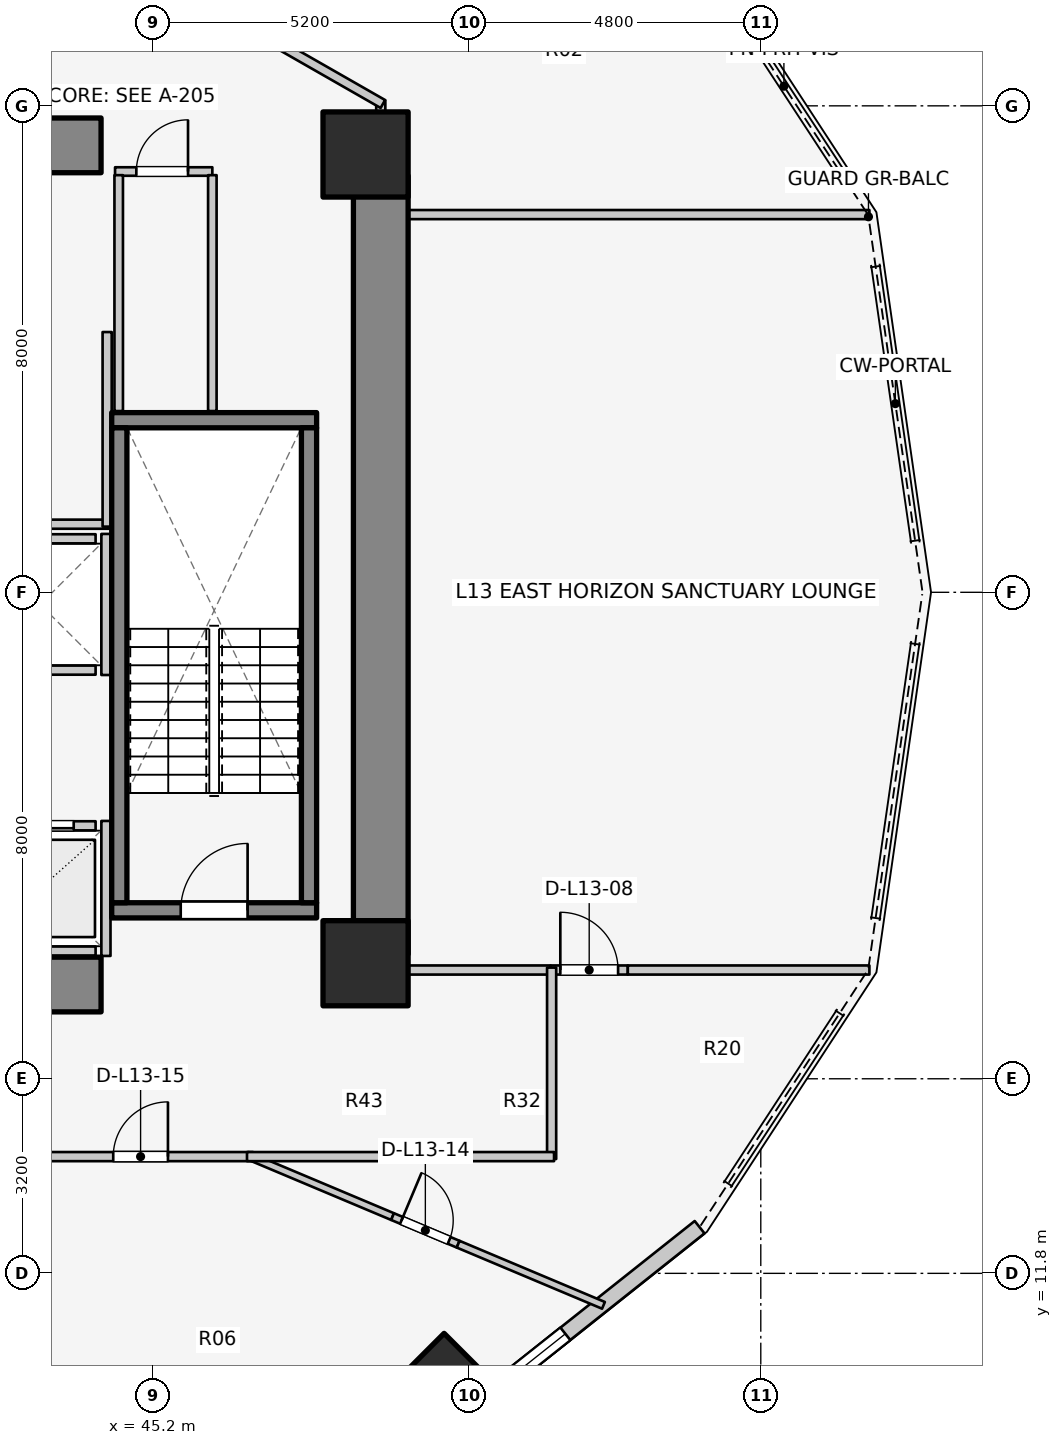
"""IFC4 building model, lengths in metres.
Left out: names, types, materials, properties, quantities, classifications, styles, units other than length and angle.
Written with IfcOpenShell. Run it as: python <this file> out.ifc"""

import sys

from ifc_helpers import new_model, si_unit, direction, frame, frame_2d, origin, origin_2d, place, context, subcontext, project, spatial, rectangle, extrude, element, fill, save


model = new_model("IFC4")
c1 = context("Model", 3, precision=1e-05, world=origin(), true_north=direction((0.0, 1.0)))
c2 = subcontext(c1, "Body", "Model", "MODEL_VIEW")
j1 = project(units=[si_unit("LENGTHUNIT", "METRE"), si_unit("PLANEANGLEUNIT", "RADIAN")], contexts=[c1])
p1 = place(None, origin())
s1 = spatial("IfcSite", under=j1, at=p1, CompositionType="ELEMENT")
p2 = place(p1, origin())
s2 = spatial("IfcBuilding", under=s1, at=p2, CompositionType="ELEMENT")
p3 = place(p2, frame((0.0, 0.0, 46.2)))
s3 = spatial("IfcBuildingStorey", under=s2, at=p3, CompositionType="ELEMENT", Elevation=46.2)
p4 = place(p3, frame((48.95, 17.05, 0.0), z_axis=(0.0, 0.0, 1.0), x_axis=(0.0, 1.0, 0.0)))
e1 = element("IfcWall", 1, at=p4, inside=s3, PredefinedType="SHEAR", context=c2, shape_type="SweptSolid", body=[
    extrude(rectangle(XDim=12.8, YDim=0.9, at=frame_2d((6.4, 0.0))), origin(), (0.0, 0.0, 1.0), 3.1),
])
for number, where, z_axis, x_axis in (
    (2, (39.85, 16.55, 0.0), (0.0, 0.0, 1.0), (1.0, 0.0, 0.0)),
    (3, (39.85, 30.35, 0.0), (0.0, 0.0, 1.0), (1.0, 0.0, 0.0)),
):
    element("IfcWall", number, at=place(p3, frame(where, z_axis=z_axis, x_axis=x_axis)), inside=s3, PredefinedType="SHEAR", context=c2, shape_type="SweptSolid", body=[
        extrude(rectangle(XDim=4.5, YDim=0.9, at=frame_2d((2.25, 0.0))), origin(), (0.0, 0.0, 1.0), 3.1),
    ])
p5 = place(p3, frame((44.525, 17.77, 0.0), z_axis=(0.0, 0.0, 1.0), x_axis=(1.0, 0.0, 0.0)))
e4 = element("IfcWall", 4, at=p5, inside=s3, PredefinedType="SOLIDWALL", context=c2, shape_type="SweptSolid", body=[
    extrude(rectangle(XDim=3.37, YDim=0.25, at=frame_2d((1.685, 0.0))), origin(), (0.0, 0.0, 1.0), 3.1),
])
p6 = place(p5, frame((1.135, 0.0, 0.0)))
e5 = element("IfcOpeningElement", 5, at=p6, cuts=e4, PredefinedType="OPENING", context=c2, shape_type="SweptSolid", body=[
    extrude(rectangle(XDim=1.1, YDim=2.1, at=frame_2d((0.55, 1.05))), frame((0.0, 0.135, 0.0), z_axis=(0.0, -1.0, 0.0), x_axis=(1.0, 0.0, 0.0)), (0.0, 0.0, 1.0), 0.27),
])
p7 = place(p3, frame((44.525, 25.83, 0.0), z_axis=(0.0, 0.0, 1.0), x_axis=(1.0, 0.0, 0.0)))
e6 = element("IfcWall", 6, at=p7, inside=s3, PredefinedType="SOLIDWALL", context=c2, shape_type="SweptSolid", body=[
    extrude(rectangle(XDim=3.37, YDim=0.25, at=frame_2d((1.685, 0.0))), origin(), (0.0, 0.0, 1.0), 3.1),
])
for number, where, z_axis, x_axis in (
    (7, (44.65, 17.895, 0.0), (0.0, 0.0, 1.0), (0.0, 1.0, 0.0)),
    (8, (47.77, 17.895, 0.0), (0.0, 0.0, 1.0), (0.0, 1.0, 0.0)),
):
    element("IfcWall", number, at=place(p3, frame(where, z_axis=z_axis, x_axis=x_axis)), inside=s3, PredefinedType="SOLIDWALL", context=c2, shape_type="SweptSolid", body=[
        extrude(rectangle(XDim=7.81, YDim=0.25, at=frame_2d((3.905, 0.0))), origin(), (0.0, 0.0, 1.0), 3.1),
    ])
for number, where, z_axis, x_axis in (
    (9, (48.7, 16.9, 0.0), (0.0, 0.0, 1.0), (1.0, 0.0, 0.0)),
    (10, (48.7, 30.2, 0.0), (0.0, 0.0, 1.0), (1.0, 0.0, 0.0)),
):
    element("IfcColumn", number, at=place(p3, frame(where, z_axis=z_axis, x_axis=x_axis)), inside=s3, PredefinedType="COLUMN", context=c2, shape_type="SweptSolid", body=[
        extrude(rectangle(XDim=1.4, YDim=1.4, at=origin_2d()), origin(), (0.0, 0.0, 1.0), 3.1),
    ])
p8 = place(p3, frame((49.992, 9.965, 0.0), z_axis=(0.0, 0.0, 1.0), x_axis=(0.707106781187, -0.707106781187, 0.0)))
e11 = element("IfcColumn", 11, at=p8, inside=s3, PredefinedType="COLUMN", context=c2, shape_type="SweptSolid", body=[
    extrude(rectangle(XDim=1.2, YDim=1.2, at=origin_2d()), origin(), (0.0, 0.0, 1.0), 3.1),
])
p9 = place(p3, frame((50.405, 9.55, 0.0), z_axis=(0.0, 0.0, 1.0), x_axis=(0.783123133379, 0.621866672179, 0.0)))
e12 = element("IfcWall", 12, at=p9, inside=s3, PredefinedType="STANDARD", context=c2, shape_type="SweptSolid", body=[
    extrude(rectangle(XDim=4.839, YDim=0.26, at=frame_2d((2.419, 0.0))), origin(), (0.0, 0.0, 1.0), 2.85),
])
p10 = place(p9, frame((0.819, 0.0, 0.75)))
e13 = element("IfcOpeningElement", 13, at=p10, cuts=e12, PredefinedType="OPENING", context=c2, shape_type="SweptSolid", body=[
    extrude(rectangle(XDim=1.2, YDim=1.5, at=frame_2d((0.6, 0.75))), frame((0.0, 0.14, 0.0), z_axis=(0.0, -1.0, 0.0), x_axis=(1.0, 0.0, 0.0)), (0.0, 0.0, 1.0), 0.28),
])
p11 = place(p3, frame((42.44, 19.16, 0.0), z_axis=(0.0, 0.0, 1.0), x_axis=(1.0, 0.0, 0.0)))
e14 = element("IfcWall", 14, at=p11, inside=s3, PredefinedType="SOLIDWALL", context=c2, shape_type="SweptSolid", body=[
    extrude(rectangle(XDim=1.82, YDim=0.15, at=frame_2d((0.91, 0.0))), origin(), (0.0, 0.0, 1.0), 2.855),
])
p12 = place(p11, frame((0.36, 0.0, 0.0)))
e15 = element("IfcOpeningElement", 15, at=p12, cuts=e14, PredefinedType="OPENING", context=c2, shape_type="SweptSolid", body=[
    extrude(rectangle(XDim=1.1, YDim=2.1, at=frame_2d((0.55, 1.05))), frame((0.0, 0.085, 0.0), z_axis=(0.0, -1.0, 0.0), x_axis=(1.0, 0.0, 0.0)), (0.0, 0.0, 1.0), 0.17),
])
p13 = place(p3, frame((42.44, 17.1, 0.0), z_axis=(0.0, 0.0, 1.0), x_axis=(1.0, 0.0, 0.0)))
e16 = element("IfcWall", 16, at=p13, inside=s3, PredefinedType="SOLIDWALL", context=c2, shape_type="SweptSolid", body=[
    extrude(rectangle(XDim=1.82, YDim=0.15, at=frame_2d((0.91, 0.0))), origin(), (0.0, 0.0, 1.0), 2.855),
])
p14 = place(p3, frame((44.43, 17.02, 0.0), z_axis=(0.0, 0.0, 1.0), x_axis=(0.0, 1.0, 0.0)))
e17 = element("IfcWall", 17, at=p14, inside=s3, PredefinedType="SOLIDWALL", context=c2, shape_type="SweptSolid", body=[
    extrude(rectangle(XDim=2.22, YDim=0.15, at=frame_2d((1.11, 0.0))), origin(), (0.0, 0.0, 1.0), 2.12),
])
for number, where, z_axis, x_axis in (
    (18, (42.44, 21.72, 0.0), (0.0, 0.0, 1.0), (1.0, 0.0, 0.0)),
    (19, (42.44, 23.88, 0.0), (0.0, 0.0, 1.0), (1.0, 0.0, 0.0)),
):
    element("IfcWall", number, at=place(p3, frame(where, z_axis=z_axis, x_axis=x_axis)), inside=s3, PredefinedType="SOLIDWALL", context=c2, shape_type="SweptSolid", body=[
        extrude(rectangle(XDim=1.82, YDim=0.15, at=frame_2d((0.91, 0.0))), origin(), (0.0, 0.0, 1.0), 2.855),
    ])
p15 = place(p3, frame((44.43, 21.64, 0.0), z_axis=(0.0, 0.0, 1.0), x_axis=(0.0, 1.0, 0.0)))
e20 = element("IfcWall", 20, at=p15, inside=s3, PredefinedType="SOLIDWALL", context=c2, shape_type="SweptSolid", body=[
    extrude(rectangle(XDim=2.32, YDim=0.15, at=frame_2d((1.16, 0.0))), origin(), (0.0, 0.0, 1.0), 2.855),
])
p16 = place(p3, frame((39.4, 24.12, 0.0), z_axis=(0.0, 0.0, 1.0), x_axis=(1.0, 0.0, 0.0)))
e21 = element("IfcWall", 21, at=p16, inside=s3, PredefinedType="PARTITIONING", context=c2, shape_type="SweptSolid", body=[
    extrude(rectangle(XDim=5.08, YDim=0.15, at=frame_2d((2.54, 0.0))), origin(), (0.0, 0.0, 1.0), 2.12),
])
p17 = place(p3, frame((44.45, 24.08, 0.0), z_axis=(0.0, 0.0, 1.0), x_axis=(0.0, 1.0, 0.0)))
e22 = element("IfcWall", 22, at=p17, inside=s3, PredefinedType="PARTITIONING", context=c2, shape_type="SweptSolid", body=[
    extrude(rectangle(XDim=3.2, YDim=0.15, at=frame_2d((1.6, 0.0))), origin(), (0.0, 0.0, 1.0), 2.855),
])
p18 = place(p3, frame((44.58, 29.92, 0.0), z_axis=(0.0, 0.0, 1.0), x_axis=(1.0, 0.0, 0.0)))
e23 = element("IfcWall", 23, at=p18, inside=s3, PredefinedType="PLUMBINGWALL", context=c2, shape_type="SweptSolid", body=[
    extrude(rectangle(XDim=1.6, YDim=0.14, at=frame_2d((0.8, 0.0))), origin(), (0.0, 0.0, 1.0), 2.855),
])
p19 = place(p18, frame((0.35, 0.0, 0.0)))
e24 = element("IfcOpeningElement", 24, at=p19, cuts=e23, PredefinedType="OPENING", context=c2, shape_type="SweptSolid", body=[
    extrude(rectangle(XDim=0.85, YDim=2.05, at=frame_2d((0.425, 1.025))), frame((0.0, 0.08, 0.0), z_axis=(0.0, -1.0, 0.0), x_axis=(1.0, 0.0, 0.0)), (0.0, 0.0, 1.0), 0.16),
])
for number, where, z_axis, x_axis in (
    (25, (44.64, 25.98, 0.0), (0.0, 0.0, 1.0), (0.0, 1.0, 0.0)),
    (26, (46.18, 25.98, 0.0), (0.0, 0.0, 1.0), (0.0, 1.0, 0.0)),
):
    element("IfcWall", number, at=place(p3, frame(where, z_axis=z_axis, x_axis=x_axis)), inside=s3, PredefinedType="PLUMBINGWALL", context=c2, shape_type="SweptSolid", body=[
        extrude(rectangle(XDim=3.88, YDim=0.14, at=frame_2d((1.94, 0.0))), origin(), (0.0, 0.0, 1.0), 2.855),
    ])
p20 = place(p3, frame((48.95, 16.788, 0.0), z_axis=(0.0, 0.0, 1.0), x_axis=(1.0, 0.0, 0.0)))
e27 = element("IfcWall", 27, at=p20, inside=s3, PredefinedType="PARTITIONING", context=c2, shape_type="SweptSolid", body=[
    extrude(rectangle(XDim=2.793, YDim=0.15, at=frame_2d((1.396, 0.0))), origin(), (0.0, 0.0, 1.0), 2.069),
])
p21 = place(p3, frame((51.743, 16.788, 0.0), z_axis=(0.0, 0.0, 1.0), x_axis=(1.0, 0.0, 0.0)))
e28 = element("IfcWall", 28, at=p21, inside=s3, PredefinedType="PARTITIONING", context=c2, shape_type="SweptSolid", body=[
    extrude(rectangle(XDim=1.27, YDim=0.15, at=frame_2d((0.635, 0.0))), origin(), (0.0, 0.0, 1.0), 2.855),
])
p22 = place(p21, frame((0.16, 0.0, 0.0)))
e29 = element("IfcOpeningElement", 29, at=p22, cuts=e28, PredefinedType="OPENING", context=c2, shape_type="SweptSolid", body=[
    extrude(rectangle(XDim=0.95, YDim=2.1, at=frame_2d((0.475, 1.05))), frame((0.0, 0.085, 0.0), z_axis=(0.0, -1.0, 0.0), x_axis=(1.0, 0.0, 0.0)), (0.0, 0.0, 1.0), 0.17),
])
p23 = place(p3, frame((53.013, 16.788, 0.0), z_axis=(0.0, 0.0, 1.0), x_axis=(1.0, 0.0, 0.0)))
e30 = element("IfcWall", 30, at=p23, inside=s3, PredefinedType="PARTITIONING", context=c2, shape_type="SweptSolid", body=[
    extrude(rectangle(XDim=3.973, YDim=0.15, at=frame_2d((1.987, 0.0))), origin(), (0.0, 0.0, 1.0), 2.855),
])
p24 = place(p3, frame((48.95, 29.212, 0.0), z_axis=(0.0, 0.0, 1.0), x_axis=(1.0, 0.0, 0.0)))
e31 = element("IfcWall", 31, at=p24, inside=s3, PredefinedType="PARTITIONING", context=c2, shape_type="SweptSolid", body=[
    extrude(rectangle(XDim=8.036, YDim=0.15, at=frame_2d((4.018, 0.0))), origin(), (0.0, 0.0, 1.0), 2.855),
])
p25 = place(p3, frame((48.95, 29.8, 0.0), z_axis=(0.0, 0.0, 1.0), x_axis=(0.0, 1.0, 0.0)))
e32 = element("IfcWall", 32, at=p25, inside=s3, PredefinedType="PARTITIONING", context=c2, shape_type="SweptSolid", body=[
    extrude(rectangle(XDim=1.29, YDim=0.15, at=frame_2d((0.645, 0.0))), origin(), (0.0, 0.0, 1.0), 2.069),
])
p26 = place(p3, frame((46.757, 32.305, 0.0), z_axis=(0.0, 0.0, 1.0), x_axis=(0.867991349648, -0.496579315857, 0.0)))
e33 = element("IfcWall", 33, at=p26, inside=s3, PredefinedType="PARTITIONING", context=c2, shape_type="SweptSolid", body=[
    extrude(rectangle(XDim=2.567, YDim=0.15, at=frame_2d((1.283, 0.0))), origin(), (0.0, 0.0, 1.0), 2.069),
])
p27 = place(p3, frame((51.76, 13.68, 0.0), z_axis=(0.0, 0.0, 1.0), x_axis=(0.0, 1.0, 0.0)))
e34 = element("IfcWall", 34, at=p27, inside=s3, PredefinedType="PARTITIONING", context=c2, shape_type="SweptSolid", body=[
    extrude(rectangle(XDim=3.148, YDim=0.15, at=frame_2d((1.574, 0.0))), origin(), (0.0, 0.0, 1.0), 2.855),
])
p28 = place(p3, frame((46.754, 13.74, 0.0), z_axis=(0.0, 0.0, 1.0), x_axis=(0.921672585584, -0.3879686134, 0.0)))
e35 = element("IfcWall", 35, at=p28, inside=s3, PredefinedType="MOVABLE", context=c2, shape_type="SweptSolid", body=[
    extrude(rectangle(XDim=2.593, YDim=0.12, at=frame_2d((1.297, 0.0))), origin(), (0.0, 0.0, 1.0), 2.855),
])
p29 = place(p3, frame((49.144, 12.733, 0.0), z_axis=(0.0, 0.0, 1.0), x_axis=(0.92176888, -0.387739773384, 0.0)))
e36 = element("IfcWall", 36, at=p29, inside=s3, PredefinedType="MOVABLE", context=c2, shape_type="SweptSolid", body=[
    extrude(rectangle(XDim=1.17, YDim=0.12, at=frame_2d((0.585, 0.0))), origin(), (0.0, 0.0, 1.0), 2.11),
])
p30 = place(p29, frame((0.16, 0.0, 0.0)))
e37 = element("IfcOpeningElement", 37, at=p30, cuts=e36, PredefinedType="OPENING", context=c2, shape_type="SweptSolid", body=[
    extrude(rectangle(XDim=0.85, YDim=2.05, at=frame_2d((0.425, 1.025))), frame((0.0, 0.07, 0.0), z_axis=(0.0, -1.0, 0.0), x_axis=(1.0, 0.0, 0.0)), (0.0, 0.0, 1.0), 0.14),
])
p31 = place(p3, frame((50.222, 12.28, 0.0), z_axis=(0.0, 0.0, 1.0), x_axis=(0.921706247461, -0.387888635295, 0.0)))
e38 = element("IfcWall", 38, at=p31, inside=s3, PredefinedType="MOVABLE", context=c2, shape_type="SweptSolid", body=[
    extrude(rectangle(XDim=2.593, YDim=0.12, at=frame_2d((1.297, 0.0))), origin(), (0.0, 0.0, 1.0), 2.855),
])
p32 = place(p3, frame((39.33, 13.72, 0.0), z_axis=(0.0, 0.0, 1.0), x_axis=(1.0, 0.0, 0.0)))
e39 = element("IfcWall", 39, at=p32, inside=s3, PredefinedType="PARTITIONING", context=c2, shape_type="SweptSolid", body=[
    extrude(rectangle(XDim=7.52, YDim=0.15, at=frame_2d((3.76, 0.0))), origin(), (0.0, 0.0, 1.0), 2.237),
])
p33 = place(p32, frame((5.22, 0.0, 0.0)))
e40 = element("IfcOpeningElement", 40, at=p33, cuts=e39, PredefinedType="OPENING", context=c2, shape_type="SweptSolid", body=[
    extrude(rectangle(XDim=0.9, YDim=2.1, at=frame_2d((0.45, 1.05))), frame((0.0, 0.085, 0.0), z_axis=(0.0, -1.0, 0.0), x_axis=(1.0, 0.0, 0.0)), (0.0, 0.0, 1.0), 0.17),
])
p34 = place(p3, frame((46.75, 13.72, 0.0), z_axis=(0.0, 0.0, 1.0), x_axis=(1.0, 0.0, 0.0)))
e41 = element("IfcWall", 41, at=p34, inside=s3, PredefinedType="PARTITIONING", context=c2, shape_type="SweptSolid", body=[
    extrude(rectangle(XDim=5.05, YDim=0.15, at=frame_2d((2.525, 0.0))), origin(), (0.0, 0.0, 1.0), 2.069),
])
p35 = place(p3, frame((37.252, 13.09, 0.0), z_axis=(0.0, 0.0, 1.0), x_axis=(0.855817136021, -0.517278483694, 0.0)))
e42 = element("IfcWall", 42, at=p35, inside=s3, PredefinedType="PARTITIONING", context=c2, shape_type="SweptSolid", body=[
    extrude(rectangle(XDim=9.564, YDim=0.18, at=frame_2d((4.782, 0.0))), origin(), (0.0, 0.0, 1.0), 2.237),
])
p36 = place(p10, origin())
e43 = element("IfcWindow", 43, at=p36, inside=s3, PartitioningType="SINGLE_PANEL", PredefinedType="WINDOW", context=c2, shape_type="SweptSolid", body=[
    extrude(rectangle(XDim=1.2, YDim=1.5, at=frame_2d((0.6, 0.75))), frame((0.0, 0.03, 0.0), z_axis=(0.0, -1.0, 0.0), x_axis=(1.0, 0.0, 0.0)), (0.0, 0.0, 1.0), 0.06),
])
fill(e13, e43)
p37 = place(p6, origin())
e44 = element("IfcDoor", 44, at=p37, inside=s3, OperationType="SINGLE_SWING_RIGHT", PredefinedType="DOOR", context=c2, shape_type="SweptSolid", body=[
    extrude(rectangle(XDim=1.1, YDim=2.1, at=frame_2d((0.55, 1.05))), frame((0.0, 0.025, 0.0), z_axis=(0.0, -1.0, 0.0), x_axis=(1.0, 0.0, 0.0)), (0.0, 0.0, 1.0), 0.05),
])
fill(e5, e44)
p38 = place(p12, origin())
e45 = element("IfcDoor", 45, at=p38, inside=s3, OperationType="DOUBLE_DOOR_SLIDING", PredefinedType="DOOR", context=c2, shape_type="SweptSolid", body=[
    extrude(rectangle(XDim=1.1, YDim=2.1, at=frame_2d((0.55, 1.05))), frame((0.0, 0.025, 0.0), z_axis=(0.0, -1.0, 0.0), x_axis=(1.0, 0.0, 0.0)), (0.0, 0.0, 1.0), 0.05),
])
fill(e15, e45)
p39 = place(p19, origin())
e46 = element("IfcDoor", 46, at=p39, inside=s3, OperationType="SINGLE_SWING_RIGHT", PredefinedType="DOOR", context=c2, shape_type="SweptSolid", body=[
    extrude(rectangle(XDim=0.85, YDim=2.05, at=frame_2d((0.425, 1.025))), frame((0.0, 0.025, 0.0), z_axis=(0.0, -1.0, 0.0), x_axis=(1.0, 0.0, 0.0)), (0.0, 0.0, 1.0), 0.05),
])
fill(e24, e46)
p40 = place(p22, origin())
e47 = element("IfcDoor", 47, at=p40, inside=s3, OperationType="SINGLE_SWING_LEFT", PredefinedType="DOOR", context=c2, shape_type="SweptSolid", body=[
    extrude(rectangle(XDim=0.95, YDim=2.1, at=frame_2d((0.475, 1.05))), frame((0.0, 0.025, 0.0), z_axis=(0.0, -1.0, 0.0), x_axis=(1.0, 0.0, 0.0)), (0.0, 0.0, 1.0), 0.05),
])
fill(e29, e47)
p41 = place(p30, origin())
e48 = element("IfcDoor", 48, at=p41, inside=s3, OperationType="SINGLE_SWING_LEFT", PredefinedType="DOOR", context=c2, shape_type="SweptSolid", body=[
    extrude(rectangle(XDim=0.85, YDim=2.05, at=frame_2d((0.425, 1.025))), frame((0.0, 0.025, 0.0), z_axis=(0.0, -1.0, 0.0), x_axis=(1.0, 0.0, 0.0)), (0.0, 0.0, 1.0), 0.05),
])
fill(e37, e48)
p42 = place(p33, origin())
e49 = element("IfcDoor", 49, at=p42, inside=s3, OperationType="SINGLE_SWING_RIGHT", PredefinedType="DOOR", context=c2, shape_type="SweptSolid", body=[
    extrude(rectangle(XDim=0.9, YDim=2.1, at=frame_2d((0.45, 1.05))), frame((0.0, 0.025, 0.0), z_axis=(0.0, -1.0, 0.0), x_axis=(1.0, 0.0, 0.0)), (0.0, 0.0, 1.0), 0.05),
])
fill(e40, e49)
save(model, sys.argv[1])
